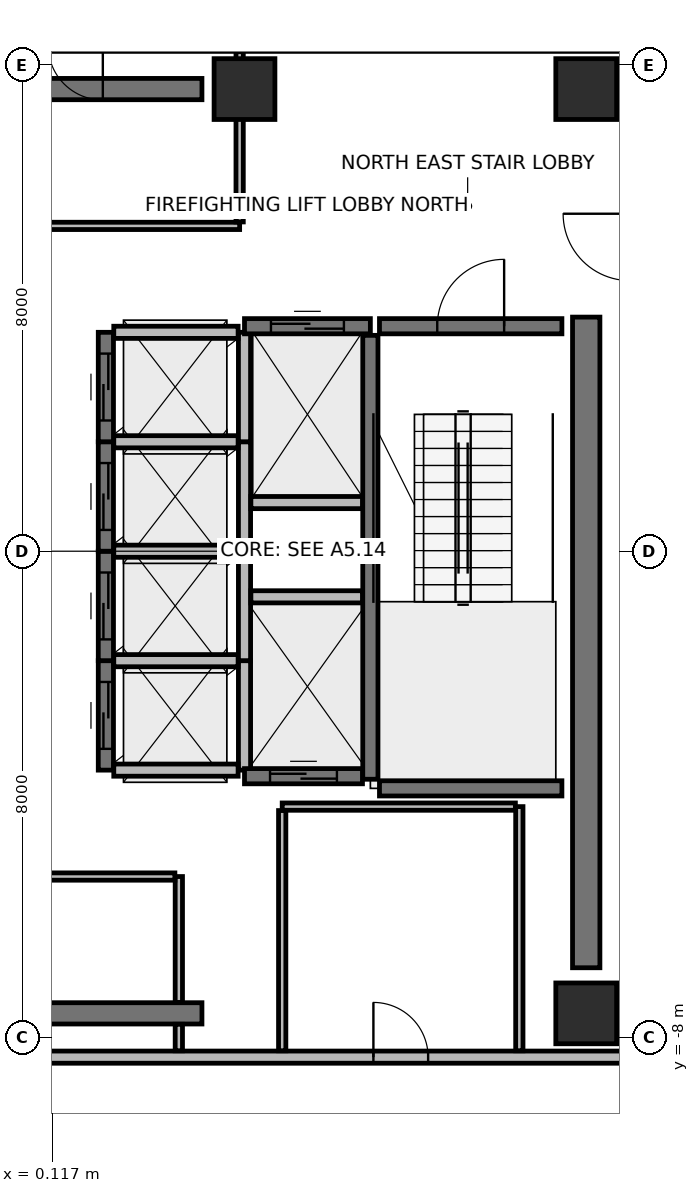
"""IFC4 building model, lengths in metres.
Left out: names, types, materials, properties, quantities, classifications, styles, units other than length and angle.
Written with IfcOpenShell. Run it as: python <this file> out.ifc"""

import sys

from ifc_helpers import new_model, si_unit, direction, frame, frame_2d, origin, origin_2d, place, context, subcontext, project, spatial, rectangle, extrude, element, fill, save


model = new_model("IFC4")
c1 = context("Model", 3, precision=1e-05, world=origin(), true_north=direction((0.0, 1.0)))
c2 = subcontext(c1, "Body", "Model", "MODEL_VIEW")
j1 = project(units=[si_unit("LENGTHUNIT", "METRE"), si_unit("PLANEANGLEUNIT", "RADIAN")], contexts=[c1])
p1 = place(None, origin())
s1 = spatial("IfcSite", under=j1, at=p1, CompositionType="ELEMENT")
p2 = place(p1, origin())
s2 = spatial("IfcBuilding", under=s1, at=p2, CompositionType="ELEMENT")
p3 = place(p2, frame((0.0, 0.0, 306.3)))
s3 = spatial("IfcBuildingStorey", under=s2, at=p3, CompositionType="ELEMENT", Elevation=306.3)
for number, where, z_axis, x_axis in (
    (1, (8.9, -7.6, 0.0), (0.0, 0.0, 1.0), (1.0, 0.0, 0.0)),
    (2, (8.9, 7.6, 0.0), (0.0, 0.0, 1.0), (1.0, 0.0, 0.0)),
    (3, (3.28, 7.6, 0.0), (0.0, 0.0, 1.0), (1.0, 0.0, 0.0)),
):
    element("IfcColumn", number, at=place(p3, frame(where, z_axis=z_axis, x_axis=x_axis)), inside=s3, PredefinedType="COLUMN", context=c2, shape_type="SweptSolid", body=[
        extrude(rectangle(XDim=1.0, YDim=1.0, at=origin_2d()), origin(), (0.0, 0.0, 1.0), 4.55),
    ])
p4 = place(p3, frame((-24.537, -0.339, 0.0), z_axis=(0.0, 0.0, 1.0), x_axis=(0.669127961041, -0.743147207324, 0.0)))
e4 = element("IfcWall", 4, at=p4, inside=s3, PredefinedType="STANDARD", context=c2, shape_type="SweptSolid", body=[
    extrude(rectangle(XDim=42.14, YDim=0.3, at=frame_2d((21.07, 0.0))), origin(), (0.0, 0.0, 1.0), 3.805),
])
p5 = place(p4, frame((20.27, 0.0, 0.0)))
e5 = element("IfcOpeningElement", 5, at=p5, cuts=e4, PredefinedType="OPENING", context=c2, shape_type="SweptSolid", body=[
    extrude(rectangle(XDim=1.6, YDim=2.3, at=frame_2d((0.8, 1.15))), frame((0.0, 0.16, 0.0), z_axis=(0.0, -1.0, 0.0), x_axis=(1.0, 0.0, 0.0)), (0.0, 0.0, 1.0), 0.32),
])
p6 = place(p4, frame((9.535, 0.0, 0.85)))
e6 = element("IfcOpeningElement", 6, at=p6, cuts=e4, PredefinedType="OPENING", context=c2, shape_type="SweptSolid", body=[
    extrude(rectangle(XDim=2.0, YDim=2.4, at=frame_2d((1.0, 1.2))), frame((0.0, 0.16, 0.0), z_axis=(0.0, -1.0, 0.0), x_axis=(1.0, 0.0, 0.0)), (0.0, 0.0, 1.0), 0.32),
])
p7 = place(p4, frame((30.605, 0.0, 0.85)))
e7 = element("IfcOpeningElement", 7, at=p7, cuts=e4, PredefinedType="OPENING", context=c2, shape_type="SweptSolid", body=[
    extrude(rectangle(XDim=2.0, YDim=2.4, at=frame_2d((1.0, 1.2))), frame((0.0, 0.16, 0.0), z_axis=(0.0, -1.0, 0.0), x_axis=(1.0, 0.0, 0.0)), (0.0, 0.0, 1.0), 0.32),
])
p8 = place(p3, frame((7.58, -30.822, 0.0), z_axis=(0.0, 0.0, 1.0), x_axis=(0.309018932156, 0.95105588667, 0.0)))
e8 = element("IfcWall", 8, at=p8, inside=s3, PredefinedType="STANDARD", context=c2, shape_type="SweptSolid", body=[
    extrude(rectangle(XDim=44.812, YDim=0.3, at=frame_2d((22.406, 0.0))), origin(), (0.0, 0.0, 1.0), 3.805),
])
p9 = place(p8, frame((21.606, 0.0, 0.0)))
e9 = element("IfcOpeningElement", 9, at=p9, cuts=e8, PredefinedType="OPENING", context=c2, shape_type="SweptSolid", body=[
    extrude(rectangle(XDim=1.6, YDim=2.3, at=frame_2d((0.8, 1.15))), frame((0.0, 0.16, 0.0), z_axis=(0.0, -1.0, 0.0), x_axis=(1.0, 0.0, 0.0)), (0.0, 0.0, 1.0), 0.32),
])
p10 = place(p8, frame((10.203, 0.0, 0.85)))
e10 = element("IfcOpeningElement", 10, at=p10, cuts=e8, PredefinedType="OPENING", context=c2, shape_type="SweptSolid", body=[
    extrude(rectangle(XDim=2.0, YDim=2.4, at=frame_2d((1.0, 1.2))), frame((0.0, 0.16, 0.0), z_axis=(0.0, -1.0, 0.0), x_axis=(1.0, 0.0, 0.0)), (0.0, 0.0, 1.0), 0.32),
])
p11 = place(p8, frame((32.609, 0.0, 0.85)))
e11 = element("IfcOpeningElement", 11, at=p11, cuts=e8, PredefinedType="OPENING", context=c2, shape_type="SweptSolid", body=[
    extrude(rectangle(XDim=2.0, YDim=2.4, at=frame_2d((1.0, 1.2))), frame((0.0, 0.16, 0.0), z_axis=(0.0, -1.0, 0.0), x_axis=(1.0, 0.0, 0.0)), (0.0, 0.0, 1.0), 0.32),
])
for number, where, z_axis, x_axis in (
    (12, (-2.8, -7.6, 0.0), (0.0, 0.0, 1.0), (1.0, 0.0, 0.0)),
    (13, (-2.8, 7.6, 0.0), (0.0, 0.0, 1.0), (1.0, 0.0, 0.0)),
):
    element("IfcWall", number, at=place(p3, frame(where, z_axis=z_axis, x_axis=x_axis)), inside=s3, PredefinedType="SHEAR", context=c2, shape_type="SweptSolid", body=[
        extrude(rectangle(XDim=5.38, YDim=0.35, at=frame_2d((2.69, 0.0))), origin(), (0.0, 0.0, 1.0), 4.31),
    ])
p12 = place(p3, frame((8.9, -6.85, 0.0), z_axis=(0.0, 0.0, 1.0), x_axis=(0.0, 1.0, 0.0)))
e14 = element("IfcWall", 14, at=p12, inside=s3, PredefinedType="SHEAR", context=c2, shape_type="SweptSolid", body=[
    extrude(rectangle(XDim=10.7, YDim=0.45, at=frame_2d((5.35, 0.0))), origin(), (0.0, 0.0, 1.0), 4.31),
])
p13 = place(p3, frame((-9.62, -8.32, 0.0), z_axis=(0.0, 0.0, 1.0), x_axis=(1.0, 0.0, 0.0)))
e15 = element("IfcWall", 15, at=p13, inside=s3, PredefinedType="PARTITIONING", context=c2, shape_type="SweptSolid", body=[
    extrude(rectangle(XDim=19.24, YDim=0.2, at=frame_2d((9.62, 0.0))), origin(), (0.0, 0.0, 1.0), 3.805),
])
p14 = place(p13, frame((8.57, 0.0, 0.0)))
e16 = element("IfcOpeningElement", 16, at=p14, cuts=e15, PredefinedType="OPENING", context=c2, shape_type="SweptSolid", body=[
    extrude(rectangle(XDim=0.9, YDim=2.1, at=frame_2d((0.45, 1.05))), frame((0.0, 0.11, 0.0), z_axis=(0.0, -1.0, 0.0), x_axis=(1.0, 0.0, 0.0)), (0.0, 0.0, 1.0), 0.22),
])
p15 = place(p13, frame((15.02, 0.0, 0.0)))
e17 = element("IfcOpeningElement", 17, at=p15, cuts=e15, PredefinedType="OPENING", context=c2, shape_type="SweptSolid", body=[
    extrude(rectangle(XDim=0.9, YDim=2.1, at=frame_2d((0.45, 1.05))), frame((0.0, 0.11, 0.0), z_axis=(0.0, -1.0, 0.0), x_axis=(1.0, 0.0, 0.0)), (0.0, 0.0, 1.0), 0.22),
])
p16 = place(p3, frame((5.35, -3.75, 0.0), z_axis=(0.0, 0.0, 1.0), x_axis=(0.0, 1.0, 0.0)))
e18 = element("IfcWall", 18, at=p16, inside=s3, PredefinedType="SHEAR", context=c2, shape_type="SweptSolid", body=[
    extrude(rectangle(XDim=7.3, YDim=0.25, at=frame_2d((3.65, 0.0))), origin(), (0.0, 0.0, 1.0), 4.31),
])
p17 = place(p3, frame((5.5, 3.7, 0.0), z_axis=(0.0, 0.0, 1.0), x_axis=(1.0, 0.0, 0.0)))
e19 = element("IfcWall", 19, at=p17, inside=s3, PredefinedType="SHEAR", context=c2, shape_type="SweptSolid", body=[
    extrude(rectangle(XDim=3.0, YDim=0.25, at=frame_2d((1.5, 0.0))), origin(), (0.0, 0.0, 1.0), 4.31),
])
p18 = place(p17, frame((0.95, 0.0, 0.0)))
e20 = element("IfcOpeningElement", 20, at=p18, cuts=e19, PredefinedType="OPENING", context=c2, shape_type="SweptSolid", body=[
    extrude(rectangle(XDim=1.1, YDim=2.15, at=frame_2d((0.55, 1.075))), frame((0.0, 0.135, 0.0), z_axis=(0.0, -1.0, 0.0), x_axis=(1.0, 0.0, 0.0)), (0.0, 0.0, 1.0), 0.27),
])
p19 = place(p3, frame((5.5, -3.9, 0.0), z_axis=(0.0, 0.0, 1.0), x_axis=(1.0, 0.0, 0.0)))
e21 = element("IfcWall", 21, at=p19, inside=s3, PredefinedType="SHEAR", context=c2, shape_type="SweptSolid", body=[
    extrude(rectangle(XDim=3.0, YDim=0.25, at=frame_2d((1.5, 0.0))), origin(), (0.0, 0.0, 1.0), 4.31),
])
p20 = place(p3, frame((1.0, -3.6, 0.0), z_axis=(0.0, 0.0, 1.0), x_axis=(0.0, 1.0, 0.0)))
e22 = element("IfcWall", 22, at=p20, inside=s3, PredefinedType="SHEAR", context=c2, shape_type="SweptSolid", body=[
    extrude(rectangle(XDim=1.8, YDim=0.25, at=frame_2d((0.9, 0.0))), origin(), (0.0, 0.0, 1.0), 4.31),
])
p21 = place(p20, frame((0.35, 0.0, 0.0)))
e23 = element("IfcOpeningElement", 23, at=p21, cuts=e22, PredefinedType="OPENING", context=c2, shape_type="SweptSolid", body=[
    extrude(rectangle(XDim=1.1, YDim=2.2, at=frame_2d((0.55, 1.1))), frame((0.0, 0.135, 0.0), z_axis=(0.0, -1.0, 0.0), x_axis=(1.0, 0.0, 0.0)), (0.0, 0.0, 1.0), 0.27),
])
p22 = place(p3, frame((3.28, -3.6, 0.0), z_axis=(0.0, 0.0, 1.0), x_axis=(0.0, 1.0, 0.0)))
e24 = element("IfcWall", 24, at=p22, inside=s3, PredefinedType="PARTITIONING", context=c2, shape_type="SweptSolid", body=[
    extrude(rectangle(XDim=1.8, YDim=0.2, at=frame_2d((0.9, 0.0))), origin(), (0.0, 0.0, 1.0), 4.31),
])
for number, where, z_axis, x_axis in (
    (25, (1.13, -3.6, 0.0), (0.0, 0.0, 1.0), (1.0, 0.0, 0.0)),
    (26, (1.13, -1.8, 0.0), (0.0, 0.0, 1.0), (1.0, 0.0, 0.0)),
):
    element("IfcWall", number, at=place(p3, frame(where, z_axis=z_axis, x_axis=x_axis)), inside=s3, PredefinedType="PARTITIONING", context=c2, shape_type="SweptSolid", body=[
        extrude(rectangle(XDim=2.045, YDim=0.2, at=frame_2d((1.022, 0.0))), origin(), (0.0, 0.0, 1.0), 4.31),
    ])
p23 = place(p3, frame((1.0, -1.8, 0.0), z_axis=(0.0, 0.0, 1.0), x_axis=(0.0, 1.0, 0.0)))
e27 = element("IfcWall", 27, at=p23, inside=s3, PredefinedType="SHEAR", context=c2, shape_type="SweptSolid", body=[
    extrude(rectangle(XDim=1.8, YDim=0.25, at=frame_2d((0.9, 0.0))), origin(), (0.0, 0.0, 1.0), 4.31),
])
p24 = place(p23, frame((0.35, 0.0, 0.0)))
e28 = element("IfcOpeningElement", 28, at=p24, cuts=e27, PredefinedType="OPENING", context=c2, shape_type="SweptSolid", body=[
    extrude(rectangle(XDim=1.1, YDim=2.2, at=frame_2d((0.55, 1.1))), frame((0.0, 0.135, 0.0), z_axis=(0.0, -1.0, 0.0), x_axis=(1.0, 0.0, 0.0)), (0.0, 0.0, 1.0), 0.27),
])
p25 = place(p3, frame((3.28, -1.8, 0.0), z_axis=(0.0, 0.0, 1.0), x_axis=(0.0, 1.0, 0.0)))
e29 = element("IfcWall", 29, at=p25, inside=s3, PredefinedType="PARTITIONING", context=c2, shape_type="SweptSolid", body=[
    extrude(rectangle(XDim=1.8, YDim=0.2, at=frame_2d((0.9, 0.0))), origin(), (0.0, 0.0, 1.0), 4.31),
])
p26 = place(p3, frame((1.13, 0.0, 0.0), z_axis=(0.0, 0.0, 1.0), x_axis=(1.0, 0.0, 0.0)))
e30 = element("IfcWall", 30, at=p26, inside=s3, PredefinedType="PARTITIONING", context=c2, shape_type="SweptSolid", body=[
    extrude(rectangle(XDim=2.045, YDim=0.2, at=frame_2d((1.022, 0.0))), origin(), (0.0, 0.0, 1.0), 4.31),
])
p27 = place(p3, frame((1.0, 0.0, 0.0), z_axis=(0.0, 0.0, 1.0), x_axis=(0.0, 1.0, 0.0)))
e31 = element("IfcWall", 31, at=p27, inside=s3, PredefinedType="SHEAR", context=c2, shape_type="SweptSolid", body=[
    extrude(rectangle(XDim=1.8, YDim=0.25, at=frame_2d((0.9, 0.0))), origin(), (0.0, 0.0, 1.0), 4.31),
])
p28 = place(p27, frame((0.35, 0.0, 0.0)))
e32 = element("IfcOpeningElement", 32, at=p28, cuts=e31, PredefinedType="OPENING", context=c2, shape_type="SweptSolid", body=[
    extrude(rectangle(XDim=1.1, YDim=2.2, at=frame_2d((0.55, 1.1))), frame((0.0, 0.135, 0.0), z_axis=(0.0, -1.0, 0.0), x_axis=(1.0, 0.0, 0.0)), (0.0, 0.0, 1.0), 0.27),
])
p29 = place(p3, frame((3.28, 0.0, 0.0), z_axis=(0.0, 0.0, 1.0), x_axis=(0.0, 1.0, 0.0)))
e33 = element("IfcWall", 33, at=p29, inside=s3, PredefinedType="PARTITIONING", context=c2, shape_type="SweptSolid", body=[
    extrude(rectangle(XDim=1.8, YDim=0.2, at=frame_2d((0.9, 0.0))), origin(), (0.0, 0.0, 1.0), 4.31),
])
p30 = place(p3, frame((1.13, 1.8, 0.0), z_axis=(0.0, 0.0, 1.0), x_axis=(1.0, 0.0, 0.0)))
e34 = element("IfcWall", 34, at=p30, inside=s3, PredefinedType="PARTITIONING", context=c2, shape_type="SweptSolid", body=[
    extrude(rectangle(XDim=2.045, YDim=0.2, at=frame_2d((1.022, 0.0))), origin(), (0.0, 0.0, 1.0), 4.31),
])
p31 = place(p3, frame((1.0, 1.8, 0.0), z_axis=(0.0, 0.0, 1.0), x_axis=(0.0, 1.0, 0.0)))
e35 = element("IfcWall", 35, at=p31, inside=s3, PredefinedType="SHEAR", context=c2, shape_type="SweptSolid", body=[
    extrude(rectangle(XDim=1.8, YDim=0.25, at=frame_2d((0.9, 0.0))), origin(), (0.0, 0.0, 1.0), 4.31),
])
p32 = place(p31, frame((0.35, 0.0, 0.0)))
e36 = element("IfcOpeningElement", 36, at=p32, cuts=e35, PredefinedType="OPENING", context=c2, shape_type="SweptSolid", body=[
    extrude(rectangle(XDim=1.1, YDim=2.2, at=frame_2d((0.55, 1.1))), frame((0.0, 0.135, 0.0), z_axis=(0.0, -1.0, 0.0), x_axis=(1.0, 0.0, 0.0)), (0.0, 0.0, 1.0), 0.27),
])
p33 = place(p3, frame((3.28, 1.8, 0.0), z_axis=(0.0, 0.0, 1.0), x_axis=(0.0, 1.0, 0.0)))
e37 = element("IfcWall", 37, at=p33, inside=s3, PredefinedType="PARTITIONING", context=c2, shape_type="SweptSolid", body=[
    extrude(rectangle(XDim=1.8, YDim=0.2, at=frame_2d((0.9, 0.0))), origin(), (0.0, 0.0, 1.0), 4.31),
])
p34 = place(p3, frame((1.13, 3.6, 0.0), z_axis=(0.0, 0.0, 1.0), x_axis=(1.0, 0.0, 0.0)))
e38 = element("IfcWall", 38, at=p34, inside=s3, PredefinedType="PARTITIONING", context=c2, shape_type="SweptSolid", body=[
    extrude(rectangle(XDim=2.045, YDim=0.2, at=frame_2d((1.022, 0.0))), origin(), (0.0, 0.0, 1.0), 3.605),
])
p35 = place(p3, frame((3.28, 3.7, 0.0), z_axis=(0.0, 0.0, 1.0), x_axis=(1.0, 0.0, 0.0)))
e39 = element("IfcWall", 39, at=p35, inside=s3, PredefinedType="SHEAR", context=c2, shape_type="SweptSolid", body=[
    extrude(rectangle(XDim=2.07, YDim=0.25, at=frame_2d((1.035, 0.0))), origin(), (0.0, 0.0, 1.0), 4.31),
])
p36 = place(p35, frame((0.435, 0.0, 0.0)))
e40 = element("IfcOpeningElement", 40, at=p36, cuts=e39, PredefinedType="OPENING", context=c2, shape_type="SweptSolid", body=[
    extrude(rectangle(XDim=1.2, YDim=2.2, at=frame_2d((0.6, 1.1))), frame((0.0, 0.135, 0.0), z_axis=(0.0, -1.0, 0.0), x_axis=(1.0, 0.0, 0.0)), (0.0, 0.0, 1.0), 0.27),
])
p37 = place(p3, frame((3.385, 0.8, 0.0), z_axis=(0.0, 0.0, 1.0), x_axis=(1.0, 0.0, 0.0)))
e41 = element("IfcWall", 41, at=p37, inside=s3, PredefinedType="PARTITIONING", context=c2, shape_type="SweptSolid", body=[
    extrude(rectangle(XDim=1.835, YDim=0.2, at=frame_2d((0.917, 0.0))), origin(), (0.0, 0.0, 1.0), 4.31),
])
p38 = place(p3, frame((3.28, -3.7, 0.0), z_axis=(0.0, 0.0, 1.0), x_axis=(1.0, 0.0, 0.0)))
e42 = element("IfcWall", 42, at=p38, inside=s3, PredefinedType="SHEAR", context=c2, shape_type="SweptSolid", body=[
    extrude(rectangle(XDim=1.94, YDim=0.25, at=frame_2d((0.97, 0.0))), origin(), (0.0, 0.0, 1.0), 4.31),
])
p39 = place(p38, frame((0.42, 0.0, 0.0)))
e43 = element("IfcOpeningElement", 43, at=p39, cuts=e42, PredefinedType="OPENING", context=c2, shape_type="SweptSolid", body=[
    extrude(rectangle(XDim=1.1, YDim=2.2, at=frame_2d((0.55, 1.1))), frame((0.0, 0.135, 0.0), z_axis=(0.0, -1.0, 0.0), x_axis=(1.0, 0.0, 0.0)), (0.0, 0.0, 1.0), 0.27),
])
p40 = place(p3, frame((3.385, -0.75, 0.0), z_axis=(0.0, 0.0, 1.0), x_axis=(1.0, 0.0, 0.0)))
e44 = element("IfcWall", 44, at=p40, inside=s3, PredefinedType="PARTITIONING", context=c2, shape_type="SweptSolid", body=[
    extrude(rectangle(XDim=1.835, YDim=0.2, at=frame_2d((0.917, 0.0))), origin(), (0.0, 0.0, 1.0), 4.31),
])
p41 = place(p3, frame((2.2, -8.215, 0.0), z_axis=(0.0, 0.0, 1.0), x_axis=(0.0, 1.0, 0.0)))
e45 = element("IfcWall", 45, at=p41, inside=s3, PredefinedType="PARTITIONING", context=c2, shape_type="SweptSolid", body=[
    extrude(rectangle(XDim=0.435, YDim=0.12, at=frame_2d((0.218, 0.0))), origin(), (0.0, 0.0, 1.0), 3.605),
])
p42 = place(p3, frame((2.2, -7.42, 0.0), z_axis=(0.0, 0.0, 1.0), x_axis=(0.0, 1.0, 0.0)))
e46 = element("IfcWall", 46, at=p42, inside=s3, PredefinedType="PARTITIONING", context=c2, shape_type="SweptSolid", body=[
    extrude(rectangle(XDim=2.07, YDim=0.12, at=frame_2d((1.035, 0.0))), origin(), (0.0, 0.0, 1.0), 3.605),
])
p43 = place(p3, frame((2.135, -5.35, 0.0), z_axis=(0.0, 0.0, 1.0), x_axis=(-1.0, 0.0, 0.0)))
e47 = element("IfcWall", 47, at=p43, inside=s3, PredefinedType="PARTITIONING", context=c2, shape_type="SweptSolid", body=[
    extrude(rectangle(XDim=5.535, YDim=0.12, at=frame_2d((2.768, 0.0))), origin(), (0.0, 0.0, 1.0), 3.605),
])
p44 = place(p3, frame((-2.2, 5.35, 0.0), z_axis=(0.0, 0.0, 1.0), x_axis=(1.0, 0.0, 0.0)))
e48 = element("IfcWall", 48, at=p44, inside=s3, PredefinedType="PARTITIONING", context=c2, shape_type="SweptSolid", body=[
    extrude(rectangle(XDim=5.4, YDim=0.12, at=frame_2d((2.7, 0.0))), origin(), (0.0, 0.0, 1.0), 3.605),
])
p45 = place(p3, frame((3.2, 5.415, 0.0), z_axis=(0.0, 0.0, 1.0), x_axis=(0.0, 1.0, 0.0)))
e49 = element("IfcWall", 49, at=p45, inside=s3, PredefinedType="PARTITIONING", context=c2, shape_type="SweptSolid", body=[
    extrude(rectangle(XDim=2.8, YDim=0.12, at=frame_2d((1.4, 0.0))), origin(), (0.0, 0.0, 1.0), 3.605),
])
p46 = place(p3, frame((7.8, -8.215, 0.0), z_axis=(0.0, 0.0, 1.0), x_axis=(0.0, 1.0, 0.0)))
e50 = element("IfcWall", 50, at=p46, inside=s3, PredefinedType="PARTITIONING", context=c2, shape_type="SweptSolid", body=[
    extrude(rectangle(XDim=4.015, YDim=0.12, at=frame_2d((2.008, 0.0))), origin(), (0.0, 0.0, 1.0), 3.605),
])
p47 = place(p3, frame((7.735, -4.2, 0.0), z_axis=(0.0, 0.0, 1.0), x_axis=(-1.0, 0.0, 0.0)))
e51 = element("IfcWall", 51, at=p47, inside=s3, PredefinedType="PARTITIONING", context=c2, shape_type="SweptSolid", body=[
    extrude(rectangle(XDim=3.835, YDim=0.12, at=frame_2d((1.917, 0.0))), origin(), (0.0, 0.0, 1.0), 4.31),
])
p48 = place(p3, frame((3.9, -4.265, 0.0), z_axis=(0.0, 0.0, 1.0), x_axis=(0.0, -1.0, 0.0)))
e52 = element("IfcWall", 52, at=p48, inside=s3, PredefinedType="PARTITIONING", context=c2, shape_type="SweptSolid", body=[
    extrude(rectangle(XDim=3.95, YDim=0.12, at=frame_2d((1.975, 0.0))), origin(), (0.0, 0.0, 1.0), 3.605),
])
p49 = place(p18, frame((1.1, 0.0, 0.0), z_axis=(0.0, 0.0, 1.0), x_axis=(-1.0, 0.0, 0.0)))
e53 = element("IfcDoor", 53, at=p49, inside=s3, OperationType="SINGLE_SWING_LEFT", PredefinedType="DOOR", context=c2, shape_type="SweptSolid", body=[
    extrude(rectangle(XDim=1.1, YDim=2.15, at=frame_2d((0.55, 1.075))), frame((0.0, 0.025, 0.0), z_axis=(0.0, -1.0, 0.0), x_axis=(1.0, 0.0, 0.0)), (0.0, 0.0, 1.0), 0.05),
])
fill(e20, e53)
p50 = place(p21, origin())
e54 = element("IfcDoor", 54, at=p50, inside=s3, OperationType="SLIDING_TO_LEFT", PredefinedType="DOOR", context=c2, shape_type="SweptSolid", body=[
    extrude(rectangle(XDim=1.1, YDim=2.2, at=frame_2d((0.55, 1.1))), frame((0.0, 0.025, 0.0), z_axis=(0.0, -1.0, 0.0), x_axis=(1.0, 0.0, 0.0)), (0.0, 0.0, 1.0), 0.05),
])
fill(e23, e54)
p51 = place(p24, origin())
e55 = element("IfcDoor", 55, at=p51, inside=s3, OperationType="SLIDING_TO_LEFT", PredefinedType="DOOR", context=c2, shape_type="SweptSolid", body=[
    extrude(rectangle(XDim=1.1, YDim=2.2, at=frame_2d((0.55, 1.1))), frame((0.0, 0.025, 0.0), z_axis=(0.0, -1.0, 0.0), x_axis=(1.0, 0.0, 0.0)), (0.0, 0.0, 1.0), 0.05),
])
fill(e28, e55)
p52 = place(p28, origin())
e56 = element("IfcDoor", 56, at=p52, inside=s3, OperationType="SLIDING_TO_LEFT", PredefinedType="DOOR", context=c2, shape_type="SweptSolid", body=[
    extrude(rectangle(XDim=1.1, YDim=2.2, at=frame_2d((0.55, 1.1))), frame((0.0, 0.025, 0.0), z_axis=(0.0, -1.0, 0.0), x_axis=(1.0, 0.0, 0.0)), (0.0, 0.0, 1.0), 0.05),
])
fill(e32, e56)
p53 = place(p32, origin())
e57 = element("IfcDoor", 57, at=p53, inside=s3, OperationType="SLIDING_TO_LEFT", PredefinedType="DOOR", context=c2, shape_type="SweptSolid", body=[
    extrude(rectangle(XDim=1.1, YDim=2.2, at=frame_2d((0.55, 1.1))), frame((0.0, 0.025, 0.0), z_axis=(0.0, -1.0, 0.0), x_axis=(1.0, 0.0, 0.0)), (0.0, 0.0, 1.0), 0.05),
])
fill(e36, e57)
p54 = place(p36, origin())
e58 = element("IfcDoor", 58, at=p54, inside=s3, OperationType="SLIDING_TO_RIGHT", PredefinedType="DOOR", context=c2, shape_type="SweptSolid", body=[
    extrude(rectangle(XDim=1.2, YDim=2.2, at=frame_2d((0.6, 1.1))), frame((0.0, 0.025, 0.0), z_axis=(0.0, -1.0, 0.0), x_axis=(1.0, 0.0, 0.0)), (0.0, 0.0, 1.0), 0.05),
])
fill(e40, e58)
p55 = place(p39, origin())
e59 = element("IfcDoor", 59, at=p55, inside=s3, OperationType="SLIDING_TO_LEFT", PredefinedType="DOOR", context=c2, shape_type="SweptSolid", body=[
    extrude(rectangle(XDim=1.1, YDim=2.2, at=frame_2d((0.55, 1.1))), frame((0.0, 0.025, 0.0), z_axis=(0.0, -1.0, 0.0), x_axis=(1.0, 0.0, 0.0)), (0.0, 0.0, 1.0), 0.05),
])
fill(e43, e59)
p56 = place(p15, origin())
e60 = element("IfcDoor", 60, at=p56, inside=s3, OperationType="SINGLE_SWING_LEFT", PredefinedType="DOOR", context=c2, shape_type="SweptSolid", body=[
    extrude(rectangle(XDim=0.9, YDim=2.1, at=frame_2d((0.45, 1.05))), frame((0.0, 0.025, 0.0), z_axis=(0.0, -1.0, 0.0), x_axis=(1.0, 0.0, 0.0)), (0.0, 0.0, 1.0), 0.05),
])
fill(e17, e60)
save(model, sys.argv[1])
